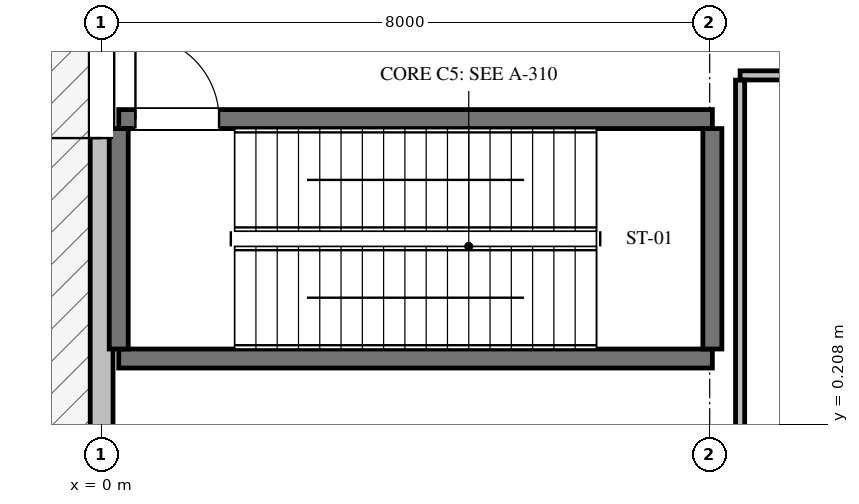
"""IFC4 building model, lengths in metres.
Left out: names, types, materials, properties, quantities, classifications, styles, units other than length and angle.
Written with IfcOpenShell. Run it as: python <this file> out.ifc"""

import sys

from ifc_helpers import new_model, si_unit, direction, frame, frame_2d, origin, place, context, subcontext, project, spatial, rectangle, extrude, element, fill, save


model = new_model("IFC4")
c1 = context("Model", 3, precision=1e-05, world=origin(), true_north=direction((0.0, 1.0)))
c2 = subcontext(c1, "Body", "Model", "MODEL_VIEW")
j1 = project(units=[si_unit("LENGTHUNIT", "METRE"), si_unit("PLANEANGLEUNIT", "RADIAN")], contexts=[c1])
p1 = place(None, origin())
s1 = spatial("IfcSite", under=j1, at=p1, CompositionType="ELEMENT")
p2 = place(p1, origin())
s2 = spatial("IfcBuilding", under=s1, at=p2, CompositionType="ELEMENT")
p3 = place(p2, frame((0.0, 0.0, 0.45)))
s3 = spatial("IfcBuildingStorey", under=s2, at=p3, CompositionType="ELEMENT", Elevation=0.45)
p4 = place(p3, frame((0.0, 0.175, 0.0), z_axis=(0.0, 0.0, 1.0), x_axis=(0.0, 1.0, 0.0)))
e1 = element("IfcWall", 1, at=p4, inside=s3, PredefinedType="SOLIDWALL", context=c2, shape_type="SweptSolid", body=[
    extrude(rectangle(XDim=22.15, YDim=0.3, at=frame_2d((11.075, 0.0))), origin(), (0.0, 0.0, 1.0), 4.694),
])
p5 = place(p4, frame((3.8, 0.0, 0.0)))
e2 = element("IfcOpeningElement", 2, at=p5, cuts=e1, PredefinedType="OPENING", context=c2, shape_type="SweptSolid", body=[
    extrude(rectangle(XDim=1.5, YDim=2.4, at=frame_2d((0.75, 1.2))), frame((0.0, 0.16, 0.0), z_axis=(0.0, -1.0, 0.0), x_axis=(1.0, 0.0, 0.0)), (0.0, 0.0, 1.0), 0.32),
])
p6 = place(p4, frame((9.2, 0.0, 1.05)))
e3 = element("IfcOpeningElement", 3, at=p6, cuts=e1, PredefinedType="OPENING", context=c2, shape_type="SweptSolid", body=[
    extrude(rectangle(XDim=1.35, YDim=1.5, at=frame_2d((0.675, 0.75))), frame((0.0, 0.16, 0.0), z_axis=(0.0, -1.0, 0.0), x_axis=(1.0, 0.0, 0.0)), (0.0, 0.0, 1.0), 0.32),
])
p7 = place(p4, frame((16.0, 0.0, 1.05)))
e4 = element("IfcOpeningElement", 4, at=p7, cuts=e1, PredefinedType="OPENING", context=c2, shape_type="SweptSolid", body=[
    extrude(rectangle(XDim=1.5, YDim=1.5, at=frame_2d((0.75, 0.75))), frame((0.0, 0.16, 0.0), z_axis=(0.0, -1.0, 0.0), x_axis=(1.0, 0.0, 0.0)), (0.0, 0.0, 1.0), 0.32),
])
p8 = place(p4, frame((19.2, 0.0, 1.05)))
e5 = element("IfcOpeningElement", 5, at=p8, cuts=e1, PredefinedType="OPENING", context=c2, shape_type="SweptSolid", body=[
    extrude(rectangle(XDim=1.65, YDim=1.5, at=frame_2d((0.825, 0.75))), frame((0.0, 0.16, 0.0), z_axis=(0.0, -1.0, 0.0), x_axis=(1.0, 0.0, 0.0)), (0.0, 0.0, 1.0), 0.32),
])
p9 = place(p3, frame((0.225, 1.075, 0.0), z_axis=(0.0, 0.0, 1.0), x_axis=(1.0, 0.0, 0.0)))
e6 = element("IfcWall", 6, at=p9, inside=s3, PredefinedType="SHEAR", context=c2, shape_type="SweptSolid", body=[
    extrude(rectangle(XDim=7.81, YDim=0.25, at=frame_2d((3.905, 0.0))), origin(), (0.0, 0.0, 1.0), 5.2),
])
p10 = place(p3, frame((0.225, 4.225, 0.0), z_axis=(0.0, 0.0, 1.0), x_axis=(1.0, 0.0, 0.0)))
e7 = element("IfcWall", 7, at=p10, inside=s3, PredefinedType="SHEAR", context=c2, shape_type="SweptSolid", body=[
    extrude(rectangle(XDim=7.81, YDim=0.25, at=frame_2d((3.905, 0.0))), origin(), (0.0, 0.0, 1.0), 5.2),
])
p11 = place(p10, frame((0.22, 0.0, 0.0)))
e8 = element("IfcOpeningElement", 8, at=p11, cuts=e7, PredefinedType="OPENING", context=c2, shape_type="SweptSolid", body=[
    extrude(rectangle(XDim=1.1, YDim=2.15, at=frame_2d((0.55, 1.075))), frame((0.0, 0.135, 0.0), z_axis=(0.0, -1.0, 0.0), x_axis=(1.0, 0.0, 0.0)), (0.0, 0.0, 1.0), 0.27),
])
for number, where, z_axis, x_axis in (
    (9, (0.225, 1.2, 0.0), (0.0, 0.0, 1.0), (0.0, 1.0, 0.0)),
    (10, (8.035, 1.2, 0.0), (0.0, 0.0, 1.0), (0.0, 1.0, 0.0)),
):
    element("IfcWall", number, at=place(p3, frame(where, z_axis=z_axis, x_axis=x_axis)), inside=s3, PredefinedType="SHEAR", context=c2, shape_type="SweptSolid", body=[
        extrude(rectangle(XDim=2.9, YDim=0.25, at=frame_2d((1.45, 0.0))), origin(), (0.0, 0.0, 1.0), 5.2),
    ])
p12 = place(p3, frame((8.4, 4.8, 0.0), z_axis=(0.0, 0.0, 1.0), x_axis=(1.0, 0.0, 0.0)))
e11 = element("IfcWall", 11, at=p12, inside=s3, PredefinedType="PARTITIONING", context=c2, shape_type="SweptSolid", body=[
    extrude(rectangle(XDim=19.6, YDim=0.12, at=frame_2d((9.8, 0.0))), origin(), (0.0, 0.0, 1.0), 5.2),
])
p13 = place(p12, frame((9.0, 0.0, 0.0)))
e12 = element("IfcOpeningElement", 12, at=p13, cuts=e11, PredefinedType="OPENING", context=c2, shape_type="SweptSolid", body=[
    extrude(rectangle(XDim=1.6, YDim=2.2, at=frame_2d((0.8, 1.1))), frame((0.0, 0.07, 0.0), z_axis=(0.0, -1.0, 0.0), x_axis=(1.0, 0.0, 0.0)), (0.0, 0.0, 1.0), 0.14),
])
p14 = place(p3, frame((8.4, 0.153, 0.0), z_axis=(0.0, 0.0, 1.0), x_axis=(0.0, 1.0, 0.0)))
e13 = element("IfcWall", 13, at=p14, inside=s3, PredefinedType="PARTITIONING", context=c2, shape_type="SweptSolid", body=[
    extrude(rectangle(XDim=4.584, YDim=0.12, at=frame_2d((2.292, 0.0))), origin(), (0.0, 0.0, 1.0), 5.2),
])
p15 = place(p5, origin())
e14 = element("IfcDoor", 14, at=p15, inside=s3, OperationType="SINGLE_SWING_LEFT", PredefinedType="DOOR", context=c2, shape_type="SweptSolid", body=[
    extrude(rectangle(XDim=1.5, YDim=2.4, at=frame_2d((0.75, 1.2))), frame((0.0, 0.025, 0.0), z_axis=(0.0, -1.0, 0.0), x_axis=(1.0, 0.0, 0.0)), (0.0, 0.0, 1.0), 0.05),
])
fill(e2, e14)
p16 = place(p11, origin())
e15 = element("IfcDoor", 15, at=p16, inside=s3, OperationType="SINGLE_SWING_LEFT", PredefinedType="DOOR", context=c2, shape_type="SweptSolid", body=[
    extrude(rectangle(XDim=1.1, YDim=2.15, at=frame_2d((0.55, 1.075))), frame((0.0, 0.025, 0.0), z_axis=(0.0, -1.0, 0.0), x_axis=(1.0, 0.0, 0.0)), (0.0, 0.0, 1.0), 0.05),
])
fill(e8, e15)
save(model, sys.argv[1])
